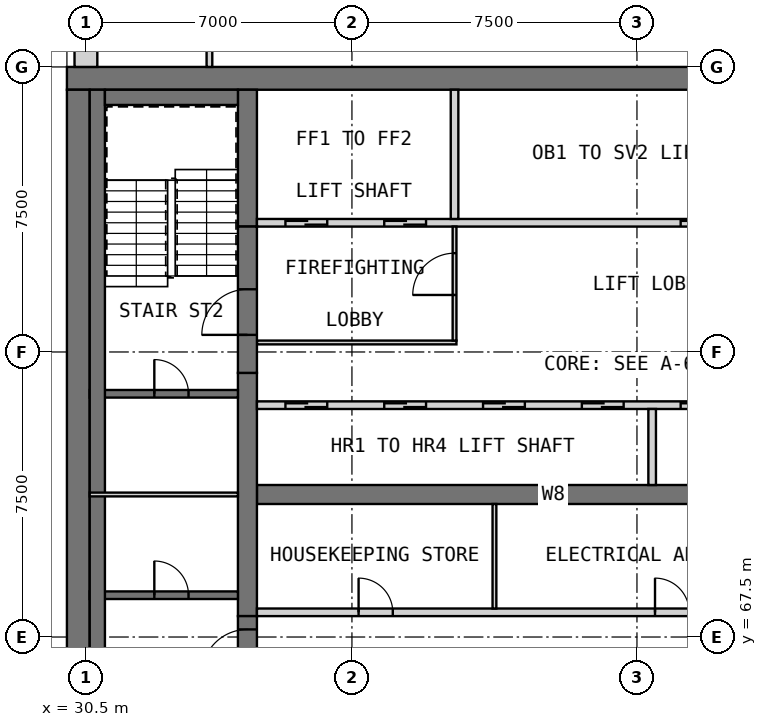
"""IFC4 building model, lengths in metres.
Left out: names, types, materials, properties, quantities, classifications, styles, units other than length and angle.
Written with IfcOpenShell. Run it as: python <this file> out.ifc"""

import sys

from ifc_helpers import new_model, si_unit, direction, frame, frame_2d, origin, place, context, subcontext, project, spatial, rectangle, extrude, element, fill, save


model = new_model("IFC4")
c1 = context("Model", 3, precision=1e-05, world=origin(), true_north=direction((0.0, 1.0)))
c2 = subcontext(c1, "Body", "Model", "MODEL_VIEW")
j1 = project(units=[si_unit("LENGTHUNIT", "METRE"), si_unit("PLANEANGLEUNIT", "RADIAN")], contexts=[c1])
p1 = place(None, origin())
s1 = spatial("IfcSite", under=j1, at=p1, CompositionType="ELEMENT")
p2 = place(p1, origin())
s2 = spatial("IfcBuilding", under=s1, at=p2, CompositionType="ELEMENT")
p3 = place(p2, frame((0.0, 0.0, 276.7)))
s3 = spatial("IfcBuildingStorey", under=s2, at=p3, CompositionType="ELEMENT", Elevation=276.7)
p4 = place(p3, frame((30.0, 82.2, 0.0), z_axis=(0.0, 0.0, 1.0), x_axis=(1.0, 0.0, 0.0)))
e1 = element("IfcWall", 1, at=p4, inside=s3, PredefinedType="SHEAR", context=c2, shape_type="SweptSolid", body=[
    extrude(rectangle(XDim=30.0, YDim=0.6, at=frame_2d((15.0, 0.0))), origin(), (0.0, 0.0, 1.0), 3.5),
])
p5 = place(p3, frame((30.3, 60.6, 0.0), z_axis=(0.0, 0.0, 1.0), x_axis=(0.0, 1.0, 0.0)))
e2 = element("IfcWall", 2, at=p5, inside=s3, PredefinedType="SHEAR", context=c2, shape_type="SweptSolid", body=[
    extrude(rectangle(XDim=21.3, YDim=0.6, at=frame_2d((10.65, 0.0))), origin(), (0.0, 0.0, 1.0), 3.5),
])
p6 = place(p3, frame((35.0, 71.25, 0.0), z_axis=(0.0, 0.0, 1.0), x_axis=(1.0, 0.0, 0.0)))
e3 = element("IfcWall", 3, at=p6, inside=s3, PredefinedType="SHEAR", context=c2, shape_type="SweptSolid", body=[
    extrude(rectangle(XDim=15.6, YDim=0.5, at=frame_2d((7.8, 0.0))), origin(), (0.0, 0.0, 1.0), 3.5),
])
p7 = place(p3, frame((34.75, 68.05, 0.0), z_axis=(0.0, 0.0, 1.0), x_axis=(0.0, 1.0, 0.0)))
e4 = element("IfcWall", 4, at=p7, inside=s3, PredefinedType="SHEAR", context=c2, shape_type="SweptSolid", body=[
    extrude(rectangle(XDim=6.4, YDim=0.5, at=frame_2d((3.2, 0.0))), origin(), (0.0, 0.0, 1.0), 3.5),
])
p8 = place(p3, frame((34.75, 78.3, 0.0), z_axis=(0.0, 0.0, 1.0), x_axis=(0.0, 1.0, 0.0)))
e5 = element("IfcWall", 5, at=p8, inside=s3, PredefinedType="SHEAR", context=c2, shape_type="SweptSolid", body=[
    extrude(rectangle(XDim=3.6, YDim=0.5, at=frame_2d((1.8, 0.0))), origin(), (0.0, 0.0, 1.0), 3.5),
])
p9 = place(p2, frame((0.0, 0.0, 34.0)))
s4 = spatial("IfcBuildingStorey", under=s2, at=p9, CompositionType="ELEMENT", Elevation=34.0)
for number, where, z_axis, x_axis in (
    (6, (29.7, 70.8, 0.0), (0.0, 0.0, 1.0), (0.0, 1.0, 0.0)),
    (7, (29.7, 75.675, 0.0), (0.0, 0.0, 1.0), (0.0, 1.0, 0.0)),
    (8, (29.7, 80.55, 0.0), (0.0, 0.0, 1.0), (0.0, 1.0, 0.0)),
):
    element("IfcWall", number, at=place(p9, frame(where, z_axis=z_axis, x_axis=x_axis)), inside=s4, PredefinedType="SOLIDWALL", context=c2, shape_type="SweptSolid", body=[
        extrude(rectangle(XDim=0.9, YDim=0.6, at=frame_2d((0.45, 0.0))), origin(), (0.0, 0.0, 1.0), 286.2),
    ])
p10 = place(p3, frame((30.5, 89.5, 0.0), z_axis=(0.0, 0.0, 1.0), x_axis=(0.0, -1.0, 0.0)))
e9 = element("IfcWall", 9, at=p10, inside=s3, PredefinedType="SOLIDWALL", context=c2, shape_type="SweptSolid", body=[
    extrude(rectangle(XDim=7.0, YDim=0.6, at=frame_2d((3.5, 0.0))), origin(), (0.0, 0.0, 1.0), 3.25),
])
p11 = place(p10, frame((3.925, 0.0, 0.8)))
e10 = element("IfcOpeningElement", 10, at=p11, cuts=e9, PredefinedType="OPENING", context=c2, shape_type="SweptSolid", body=[
    extrude(rectangle(XDim=2.4, YDim=1.8, at=frame_2d((1.2, 0.9))), frame((0.0, 0.31, 0.0), z_axis=(0.0, -1.0, 0.0), x_axis=(1.0, 0.0, 0.0)), (0.0, 0.0, 1.0), 0.62),
])
p12 = place(p10, frame((0.425, 0.0, 0.8)))
e11 = element("IfcOpeningElement", 11, at=p12, cuts=e9, PredefinedType="OPENING", context=c2, shape_type="SweptSolid", body=[
    extrude(rectangle(XDim=2.4, YDim=1.8, at=frame_2d((1.2, 0.9))), frame((0.0, 0.31, 0.0), z_axis=(0.0, -1.0, 0.0), x_axis=(1.0, 0.0, 0.0)), (0.0, 0.0, 1.0), 0.62),
])
p13 = place(p3, frame((35.0, 68.15, 0.0), z_axis=(0.0, 0.0, 1.0), x_axis=(1.0, 0.0, 0.0)))
e12 = element("IfcWall", 12, at=p13, inside=s3, PredefinedType="PARTITIONING", context=c2, shape_type="SweptSolid", body=[
    extrude(rectangle(XDim=15.6, YDim=0.2, at=frame_2d((7.8, 0.0))), origin(), (0.0, 0.0, 1.0), 3.25),
])
p14 = place(p13, frame((2.675, 0.0, 0.0)))
e13 = element("IfcOpeningElement", 13, at=p14, cuts=e12, PredefinedType="OPENING", context=c2, shape_type="SweptSolid", body=[
    extrude(rectangle(XDim=0.9, YDim=2.1, at=frame_2d((0.45, 1.05))), frame((0.0, 0.11, 0.0), z_axis=(0.0, -1.0, 0.0), x_axis=(1.0, 0.0, 0.0)), (0.0, 0.0, 1.0), 0.22),
])
p15 = place(p13, frame((10.475, 0.0, 0.0)))
e14 = element("IfcOpeningElement", 14, at=p15, cuts=e12, PredefinedType="OPENING", context=c2, shape_type="SweptSolid", body=[
    extrude(rectangle(XDim=0.9, YDim=2.1, at=frame_2d((0.45, 1.05))), frame((0.0, 0.11, 0.0), z_axis=(0.0, -1.0, 0.0), x_axis=(1.0, 0.0, 0.0)), (0.0, 0.0, 1.0), 0.22),
])
p16 = place(p3, frame((41.25, 68.25, 0.0), z_axis=(0.0, 0.0, 1.0), x_axis=(0.0, 1.0, 0.0)))
e15 = element("IfcWall", 15, at=p16, inside=s3, PredefinedType="PARTITIONING", context=c2, shape_type="SweptSolid", body=[
    extrude(rectangle(XDim=2.75, YDim=0.1, at=frame_2d((1.375, 0.0))), origin(), (0.0, 0.0, 1.0), 3.25),
])
p17 = place(p3, frame((35.0, 73.6, 0.0), z_axis=(0.0, 0.0, 1.0), x_axis=(1.0, 0.0, 0.0)))
e16 = element("IfcWall", 16, at=p17, inside=s3, PredefinedType="SOLIDWALL", context=c2, shape_type="SweptSolid", body=[
    extrude(rectangle(XDim=15.6, YDim=0.2, at=frame_2d((7.8, 0.0))), origin(), (0.0, 0.0, 1.0), 3.5),
])
p18 = place(p17, frame((0.75, 0.0, 0.0)))
e17 = element("IfcOpeningElement", 17, at=p18, cuts=e16, PredefinedType="OPENING", context=c2, shape_type="SweptSolid", body=[
    extrude(rectangle(XDim=1.1, YDim=2.1, at=frame_2d((0.55, 1.05))), frame((0.0, 0.11, 0.0), z_axis=(0.0, -1.0, 0.0), x_axis=(1.0, 0.0, 0.0)), (0.0, 0.0, 1.0), 0.22),
])
p19 = place(p17, frame((3.35, 0.0, 0.0)))
e18 = element("IfcOpeningElement", 18, at=p19, cuts=e16, PredefinedType="OPENING", context=c2, shape_type="SweptSolid", body=[
    extrude(rectangle(XDim=1.1, YDim=2.1, at=frame_2d((0.55, 1.05))), frame((0.0, 0.11, 0.0), z_axis=(0.0, -1.0, 0.0), x_axis=(1.0, 0.0, 0.0)), (0.0, 0.0, 1.0), 0.22),
])
p20 = place(p17, frame((5.95, 0.0, 0.0)))
e19 = element("IfcOpeningElement", 19, at=p20, cuts=e16, PredefinedType="OPENING", context=c2, shape_type="SweptSolid", body=[
    extrude(rectangle(XDim=1.1, YDim=2.1, at=frame_2d((0.55, 1.05))), frame((0.0, 0.11, 0.0), z_axis=(0.0, -1.0, 0.0), x_axis=(1.0, 0.0, 0.0)), (0.0, 0.0, 1.0), 0.22),
])
p21 = place(p17, frame((8.55, 0.0, 0.0)))
e20 = element("IfcOpeningElement", 20, at=p21, cuts=e16, PredefinedType="OPENING", context=c2, shape_type="SweptSolid", body=[
    extrude(rectangle(XDim=1.1, YDim=2.1, at=frame_2d((0.55, 1.05))), frame((0.0, 0.11, 0.0), z_axis=(0.0, -1.0, 0.0), x_axis=(1.0, 0.0, 0.0)), (0.0, 0.0, 1.0), 0.22),
])
p22 = place(p17, frame((11.15, 0.0, 0.0)))
e21 = element("IfcOpeningElement", 21, at=p22, cuts=e16, PredefinedType="OPENING", context=c2, shape_type="SweptSolid", body=[
    extrude(rectangle(XDim=1.1, YDim=2.1, at=frame_2d((0.55, 1.05))), frame((0.0, 0.11, 0.0), z_axis=(0.0, -1.0, 0.0), x_axis=(1.0, 0.0, 0.0)), (0.0, 0.0, 1.0), 0.22),
])
p23 = place(p17, frame((13.75, 0.0, 0.0)))
e22 = element("IfcOpeningElement", 22, at=p23, cuts=e16, PredefinedType="OPENING", context=c2, shape_type="SweptSolid", body=[
    extrude(rectangle(XDim=1.1, YDim=2.1, at=frame_2d((0.55, 1.05))), frame((0.0, 0.11, 0.0), z_axis=(0.0, -1.0, 0.0), x_axis=(1.0, 0.0, 0.0)), (0.0, 0.0, 1.0), 0.22),
])
p24 = place(p3, frame((45.4, 71.5, 0.0), z_axis=(0.0, 0.0, 1.0), x_axis=(0.0, 1.0, 0.0)))
e23 = element("IfcWall", 23, at=p24, inside=s3, PredefinedType="SOLIDWALL", context=c2, shape_type="SweptSolid", body=[
    extrude(rectangle(XDim=2.0, YDim=0.2, at=frame_2d((1.0, 0.0))), origin(), (0.0, 0.0, 1.0), 3.5),
])
p25 = place(p3, frame((35.0, 78.4, 0.0), z_axis=(0.0, 0.0, 1.0), x_axis=(1.0, 0.0, 0.0)))
e24 = element("IfcWall", 24, at=p25, inside=s3, PredefinedType="SOLIDWALL", context=c2, shape_type="SweptSolid", body=[
    extrude(rectangle(XDim=15.6, YDim=0.2, at=frame_2d((7.8, 0.0))), origin(), (0.0, 0.0, 1.0), 3.5),
])
p26 = place(p25, frame((0.75, 0.0, 0.0)))
e25 = element("IfcOpeningElement", 25, at=p26, cuts=e24, PredefinedType="OPENING", context=c2, shape_type="SweptSolid", body=[
    extrude(rectangle(XDim=1.1, YDim=2.1, at=frame_2d((0.55, 1.05))), frame((0.0, 0.11, 0.0), z_axis=(0.0, -1.0, 0.0), x_axis=(1.0, 0.0, 0.0)), (0.0, 0.0, 1.0), 0.22),
])
p27 = place(p25, frame((3.35, 0.0, 0.0)))
e26 = element("IfcOpeningElement", 26, at=p27, cuts=e24, PredefinedType="OPENING", context=c2, shape_type="SweptSolid", body=[
    extrude(rectangle(XDim=1.1, YDim=2.1, at=frame_2d((0.55, 1.05))), frame((0.0, 0.11, 0.0), z_axis=(0.0, -1.0, 0.0), x_axis=(1.0, 0.0, 0.0)), (0.0, 0.0, 1.0), 0.22),
])
p28 = place(p25, frame((11.15, 0.0, 0.0)))
e27 = element("IfcOpeningElement", 27, at=p28, cuts=e24, PredefinedType="OPENING", context=c2, shape_type="SweptSolid", body=[
    extrude(rectangle(XDim=1.1, YDim=2.1, at=frame_2d((0.55, 1.05))), frame((0.0, 0.11, 0.0), z_axis=(0.0, -1.0, 0.0), x_axis=(1.0, 0.0, 0.0)), (0.0, 0.0, 1.0), 0.22),
])
p29 = place(p25, frame((13.75, 0.0, 0.0)))
e28 = element("IfcOpeningElement", 28, at=p29, cuts=e24, PredefinedType="OPENING", context=c2, shape_type="SweptSolid", body=[
    extrude(rectangle(XDim=1.1, YDim=2.1, at=frame_2d((0.55, 1.05))), frame((0.0, 0.11, 0.0), z_axis=(0.0, -1.0, 0.0), x_axis=(1.0, 0.0, 0.0)), (0.0, 0.0, 1.0), 0.22),
])
p30 = place(p3, frame((40.2, 78.5, 0.0), z_axis=(0.0, 0.0, 1.0), x_axis=(0.0, 1.0, 0.0)))
e29 = element("IfcWall", 29, at=p30, inside=s3, PredefinedType="SOLIDWALL", context=c2, shape_type="SweptSolid", body=[
    extrude(rectangle(XDim=3.4, YDim=0.2, at=frame_2d((1.7, 0.0))), origin(), (0.0, 0.0, 1.0), 3.5),
])
p31 = place(p3, frame((35.0, 75.25, 0.0), z_axis=(0.0, 0.0, 1.0), x_axis=(1.0, 0.0, 0.0)))
e30 = element("IfcWall", 30, at=p31, inside=s3, PredefinedType="PARTITIONING", context=c2, shape_type="SweptSolid", body=[
    extrude(rectangle(XDim=5.25, YDim=0.1, at=frame_2d((2.625, 0.0))), origin(), (0.0, 0.0, 1.0), 3.25),
])
p32 = place(p3, frame((40.2, 75.3, 0.0), z_axis=(0.0, 0.0, 1.0), x_axis=(0.0, 1.0, 0.0)))
e31 = element("IfcWall", 31, at=p32, inside=s3, PredefinedType="PARTITIONING", context=c2, shape_type="SweptSolid", body=[
    extrude(rectangle(XDim=3.0, YDim=0.1, at=frame_2d((1.5, 0.0))), origin(), (0.0, 0.0, 1.0), 3.25),
])
p33 = place(p32, frame((1.2, 0.0, 0.0)))
e32 = element("IfcOpeningElement", 32, at=p33, cuts=e31, PredefinedType="OPENING", context=c2, shape_type="SweptSolid", body=[
    extrude(rectangle(XDim=1.1, YDim=2.1, at=frame_2d((0.55, 1.05))), frame((0.0, 0.06, 0.0), z_axis=(0.0, -1.0, 0.0), x_axis=(1.0, 0.0, 0.0)), (0.0, 0.0, 1.0), 0.12),
])
p34 = place(p3, frame((34.75, 64.2, 0.0), z_axis=(0.0, 0.0, 1.0), x_axis=(0.0, 1.0, 0.0)))
e33 = element("IfcWall", 33, at=p34, inside=s3, PredefinedType="SOLIDWALL", context=c2, shape_type="SweptSolid", body=[
    extrude(rectangle(XDim=3.85, YDim=0.5, at=frame_2d((1.925, 0.0))), origin(), (0.0, 0.0, 1.0), 2.3),
])
p35 = place(p34, frame((2.3, 0.0, 0.0)))
e34 = element("IfcOpeningElement", 34, at=p35, cuts=e33, PredefinedType="OPENING", context=c2, shape_type="SweptSolid", body=[
    extrude(rectangle(XDim=1.2, YDim=2.1, at=frame_2d((0.6, 1.05))), frame((0.0, 0.26, 0.0), z_axis=(0.0, -1.0, 0.0), x_axis=(1.0, 0.0, 0.0)), (0.0, 0.0, 1.0), 0.52),
])
p36 = place(p3, frame((34.75, 74.45, 0.0), z_axis=(0.0, 0.0, 1.0), x_axis=(0.0, 1.0, 0.0)))
e35 = element("IfcWall", 35, at=p36, inside=s3, PredefinedType="SOLIDWALL", context=c2, shape_type="SweptSolid", body=[
    extrude(rectangle(XDim=3.85, YDim=0.5, at=frame_2d((1.925, 0.0))), origin(), (0.0, 0.0, 1.0), 2.3),
])
p37 = place(p36, frame((1.0, 0.0, 0.0)))
e36 = element("IfcOpeningElement", 36, at=p37, cuts=e35, PredefinedType="OPENING", context=c2, shape_type="SweptSolid", body=[
    extrude(rectangle(XDim=1.2, YDim=2.1, at=frame_2d((0.6, 1.05))), frame((0.0, 0.26, 0.0), z_axis=(0.0, -1.0, 0.0), x_axis=(1.0, 0.0, 0.0)), (0.0, 0.0, 1.0), 0.52),
])
p38 = place(p3, frame((30.6, 68.6, 0.0), z_axis=(0.0, 0.0, 1.0), x_axis=(1.0, 0.0, 0.0)))
e37 = element("IfcWall", 37, at=p38, inside=s3, PredefinedType="SOLIDWALL", context=c2, shape_type="SweptSolid", body=[
    extrude(rectangle(XDim=3.9, YDim=0.2, at=frame_2d((1.95, 0.0))), origin(), (0.0, 0.0, 1.0), 3.25),
])
p39 = place(p38, frame((1.7, 0.0, 0.0)))
e38 = element("IfcOpeningElement", 38, at=p39, cuts=e37, PredefinedType="OPENING", context=c2, shape_type="SweptSolid", body=[
    extrude(rectangle(XDim=0.9, YDim=2.1, at=frame_2d((0.45, 1.05))), frame((0.0, 0.11, 0.0), z_axis=(0.0, -1.0, 0.0), x_axis=(1.0, 0.0, 0.0)), (0.0, 0.0, 1.0), 0.22),
])
p40 = place(p3, frame((30.6, 73.9, 0.0), z_axis=(0.0, 0.0, 1.0), x_axis=(1.0, 0.0, 0.0)))
e39 = element("IfcWall", 39, at=p40, inside=s3, PredefinedType="SOLIDWALL", context=c2, shape_type="SweptSolid", body=[
    extrude(rectangle(XDim=3.9, YDim=0.2, at=frame_2d((1.95, 0.0))), origin(), (0.0, 0.0, 1.0), 3.25),
])
p41 = place(p40, frame((1.7, 0.0, 0.0)))
e40 = element("IfcOpeningElement", 40, at=p41, cuts=e39, PredefinedType="OPENING", context=c2, shape_type="SweptSolid", body=[
    extrude(rectangle(XDim=0.9, YDim=2.1, at=frame_2d((0.45, 1.05))), frame((0.0, 0.11, 0.0), z_axis=(0.0, -1.0, 0.0), x_axis=(1.0, 0.0, 0.0)), (0.0, 0.0, 1.0), 0.22),
])
p42 = place(p3, frame((30.8, 60.6, 0.0), z_axis=(0.0, 0.0, 1.0), x_axis=(0.0, 1.0, 0.0)))
e41 = element("IfcWall", 41, at=p42, inside=s3, PredefinedType="SOLIDWALL", context=c2, shape_type="SweptSolid", body=[
    extrude(rectangle(XDim=21.3, YDim=0.4, at=frame_2d((10.65, 0.0))), origin(), (0.0, 0.0, 1.0), 3.25),
])
p43 = place(p3, frame((31.0, 81.7, 0.0), z_axis=(0.0, 0.0, 1.0), x_axis=(1.0, 0.0, 0.0)))
e42 = element("IfcWall", 42, at=p43, inside=s3, PredefinedType="SOLIDWALL", context=c2, shape_type="SweptSolid", body=[
    extrude(rectangle(XDim=3.5, YDim=0.4, at=frame_2d((1.75, 0.0))), origin(), (0.0, 0.0, 1.0), 3.25),
])
p44 = place(p3, frame((30.6, 71.25, 0.0), z_axis=(0.0, 0.0, 1.0), x_axis=(1.0, 0.0, 0.0)))
e43 = element("IfcWall", 43, at=p44, inside=s3, PredefinedType="PARTITIONING", context=c2, shape_type="SweptSolid", body=[
    extrude(rectangle(XDim=3.9, YDim=0.1, at=frame_2d((1.95, 0.0))), origin(), (0.0, 0.0, 1.0), 3.25),
])
p45 = place(p3, frame((33.75, 82.5, 0.0), z_axis=(0.0, 0.0, 1.0), x_axis=(0.0, 1.0, 0.0)))
e44 = element("IfcWall", 44, at=p45, inside=s3, PredefinedType="PARTITIONING", context=c2, shape_type="SweptSolid", body=[
    extrude(rectangle(XDim=1.725, YDim=0.15, at=frame_2d((0.863, 0.0))), origin(), (0.0, 0.0, 1.0), 3.25),
])
p46 = place(p14, origin())
e45 = element("IfcDoor", 45, at=p46, inside=s3, OperationType="SINGLE_SWING_LEFT", PredefinedType="DOOR", context=c2, shape_type="SweptSolid", body=[
    extrude(rectangle(XDim=0.9, YDim=2.1, at=frame_2d((0.45, 1.05))), frame((0.0, 0.025, 0.0), z_axis=(0.0, -1.0, 0.0), x_axis=(1.0, 0.0, 0.0)), (0.0, 0.0, 1.0), 0.05),
])
fill(e13, e45)
p47 = place(p15, origin())
e46 = element("IfcDoor", 46, at=p47, inside=s3, OperationType="SINGLE_SWING_RIGHT", PredefinedType="DOOR", context=c2, shape_type="SweptSolid", body=[
    extrude(rectangle(XDim=0.9, YDim=2.1, at=frame_2d((0.45, 1.05))), frame((0.0, 0.025, 0.0), z_axis=(0.0, -1.0, 0.0), x_axis=(1.0, 0.0, 0.0)), (0.0, 0.0, 1.0), 0.05),
])
fill(e14, e46)
p48 = place(p18, origin())
e47 = element("IfcDoor", 47, at=p48, inside=s3, OperationType="DOUBLE_DOOR_SLIDING", PredefinedType="DOOR", context=c2, shape_type="SweptSolid", body=[
    extrude(rectangle(XDim=1.1, YDim=2.1, at=frame_2d((0.55, 1.05))), frame((0.0, 0.025, 0.0), z_axis=(0.0, -1.0, 0.0), x_axis=(1.0, 0.0, 0.0)), (0.0, 0.0, 1.0), 0.05),
])
fill(e17, e47)
p49 = place(p19, origin())
e48 = element("IfcDoor", 48, at=p49, inside=s3, OperationType="DOUBLE_DOOR_SLIDING", PredefinedType="DOOR", context=c2, shape_type="SweptSolid", body=[
    extrude(rectangle(XDim=1.1, YDim=2.1, at=frame_2d((0.55, 1.05))), frame((0.0, 0.025, 0.0), z_axis=(0.0, -1.0, 0.0), x_axis=(1.0, 0.0, 0.0)), (0.0, 0.0, 1.0), 0.05),
])
fill(e18, e48)
p50 = place(p20, origin())
e49 = element("IfcDoor", 49, at=p50, inside=s3, OperationType="DOUBLE_DOOR_SLIDING", PredefinedType="DOOR", context=c2, shape_type="SweptSolid", body=[
    extrude(rectangle(XDim=1.1, YDim=2.1, at=frame_2d((0.55, 1.05))), frame((0.0, 0.025, 0.0), z_axis=(0.0, -1.0, 0.0), x_axis=(1.0, 0.0, 0.0)), (0.0, 0.0, 1.0), 0.05),
])
fill(e19, e49)
p51 = place(p21, origin())
e50 = element("IfcDoor", 50, at=p51, inside=s3, OperationType="DOUBLE_DOOR_SLIDING", PredefinedType="DOOR", context=c2, shape_type="SweptSolid", body=[
    extrude(rectangle(XDim=1.1, YDim=2.1, at=frame_2d((0.55, 1.05))), frame((0.0, 0.025, 0.0), z_axis=(0.0, -1.0, 0.0), x_axis=(1.0, 0.0, 0.0)), (0.0, 0.0, 1.0), 0.05),
])
fill(e20, e50)
p52 = place(p22, origin())
e51 = element("IfcDoor", 51, at=p52, inside=s3, OperationType="DOUBLE_DOOR_SLIDING", PredefinedType="DOOR", context=c2, shape_type="SweptSolid", body=[
    extrude(rectangle(XDim=1.1, YDim=2.1, at=frame_2d((0.55, 1.05))), frame((0.0, 0.025, 0.0), z_axis=(0.0, -1.0, 0.0), x_axis=(1.0, 0.0, 0.0)), (0.0, 0.0, 1.0), 0.05),
])
fill(e21, e51)
p53 = place(p26, origin())
e52 = element("IfcDoor", 52, at=p53, inside=s3, OperationType="DOUBLE_DOOR_SLIDING", PredefinedType="DOOR", context=c2, shape_type="SweptSolid", body=[
    extrude(rectangle(XDim=1.1, YDim=2.1, at=frame_2d((0.55, 1.05))), frame((0.0, 0.025, 0.0), z_axis=(0.0, -1.0, 0.0), x_axis=(1.0, 0.0, 0.0)), (0.0, 0.0, 1.0), 0.05),
])
fill(e25, e52)
p54 = place(p27, origin())
e53 = element("IfcDoor", 53, at=p54, inside=s3, OperationType="DOUBLE_DOOR_SLIDING", PredefinedType="DOOR", context=c2, shape_type="SweptSolid", body=[
    extrude(rectangle(XDim=1.1, YDim=2.1, at=frame_2d((0.55, 1.05))), frame((0.0, 0.025, 0.0), z_axis=(0.0, -1.0, 0.0), x_axis=(1.0, 0.0, 0.0)), (0.0, 0.0, 1.0), 0.05),
])
fill(e26, e53)
p55 = place(p28, origin())
e54 = element("IfcDoor", 54, at=p55, inside=s3, OperationType="DOUBLE_DOOR_SLIDING", PredefinedType="DOOR", context=c2, shape_type="SweptSolid", body=[
    extrude(rectangle(XDim=1.1, YDim=2.1, at=frame_2d((0.55, 1.05))), frame((0.0, 0.025, 0.0), z_axis=(0.0, -1.0, 0.0), x_axis=(1.0, 0.0, 0.0)), (0.0, 0.0, 1.0), 0.05),
])
fill(e27, e54)
p56 = place(p33, origin())
e55 = element("IfcDoor", 55, at=p56, inside=s3, OperationType="SINGLE_SWING_LEFT", PredefinedType="DOOR", context=c2, shape_type="SweptSolid", body=[
    extrude(rectangle(XDim=1.1, YDim=2.1, at=frame_2d((0.55, 1.05))), frame((0.0, 0.025, 0.0), z_axis=(0.0, -1.0, 0.0), x_axis=(1.0, 0.0, 0.0)), (0.0, 0.0, 1.0), 0.05),
])
fill(e32, e55)
p57 = place(p35, origin())
e56 = element("IfcDoor", 56, at=p57, inside=s3, OperationType="SINGLE_SWING_LEFT", PredefinedType="DOOR", context=c2, shape_type="SweptSolid", body=[
    extrude(rectangle(XDim=1.2, YDim=2.1, at=frame_2d((0.6, 1.05))), frame((0.0, 0.025, 0.0), z_axis=(0.0, -1.0, 0.0), x_axis=(1.0, 0.0, 0.0)), (0.0, 0.0, 1.0), 0.05),
])
fill(e34, e56)
p58 = place(p37, origin())
e57 = element("IfcDoor", 57, at=p58, inside=s3, OperationType="SINGLE_SWING_RIGHT", PredefinedType="DOOR", context=c2, shape_type="SweptSolid", body=[
    extrude(rectangle(XDim=1.2, YDim=2.1, at=frame_2d((0.6, 1.05))), frame((0.0, 0.025, 0.0), z_axis=(0.0, -1.0, 0.0), x_axis=(1.0, 0.0, 0.0)), (0.0, 0.0, 1.0), 0.05),
])
fill(e36, e57)
p59 = place(p39, origin())
e58 = element("IfcDoor", 58, at=p59, inside=s3, OperationType="SINGLE_SWING_LEFT", PredefinedType="DOOR", context=c2, shape_type="SweptSolid", body=[
    extrude(rectangle(XDim=0.9, YDim=2.1, at=frame_2d((0.45, 1.05))), frame((0.0, 0.025, 0.0), z_axis=(0.0, -1.0, 0.0), x_axis=(1.0, 0.0, 0.0)), (0.0, 0.0, 1.0), 0.05),
])
fill(e38, e58)
p60 = place(p41, origin())
e59 = element("IfcDoor", 59, at=p60, inside=s3, OperationType="SINGLE_SWING_RIGHT", PredefinedType="DOOR", context=c2, shape_type="SweptSolid", body=[
    extrude(rectangle(XDim=0.9, YDim=2.1, at=frame_2d((0.45, 1.05))), frame((0.0, 0.025, 0.0), z_axis=(0.0, -1.0, 0.0), x_axis=(1.0, 0.0, 0.0)), (0.0, 0.0, 1.0), 0.05),
])
fill(e40, e59)
save(model, sys.argv[1])
